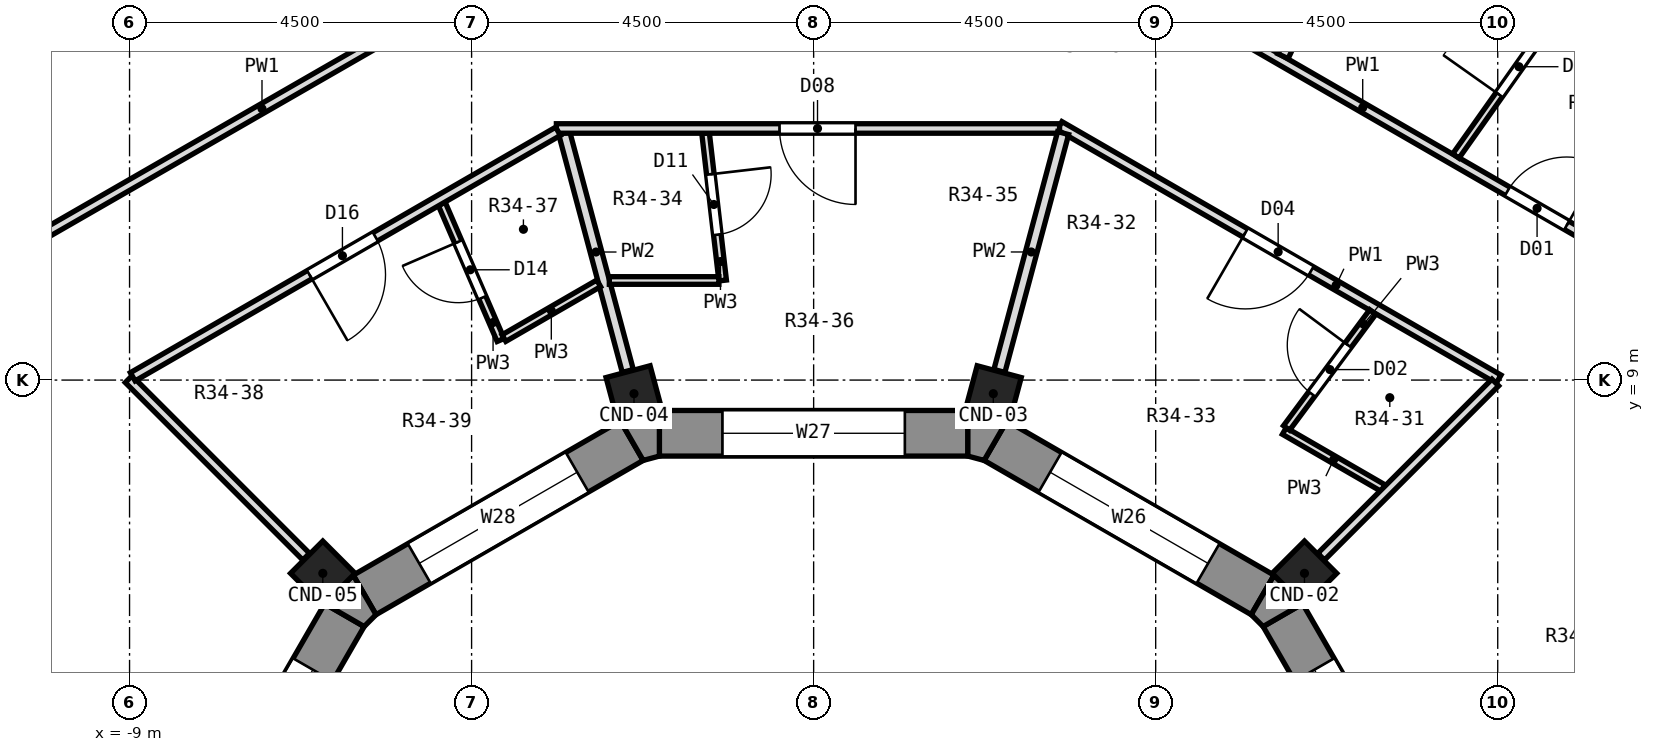
"""IFC4 building model, lengths in metres.
Left out: names, types, materials, properties, quantities, classifications, styles, units other than length and angle.
Written with IfcOpenShell. Run it as: python <this file> out.ifc"""

import sys

from ifc_helpers import new_model, si_unit, direction, frame, frame_2d, origin, origin_2d, place, context, subcontext, project, spatial, polyline, rectangle, outline, extrude, element, fill, save


model = new_model("IFC4")
c1 = context("Model", 3, precision=1e-05, world=origin(), true_north=direction((0.0, 1.0)))
c2 = subcontext(c1, "Body", "Model", "MODEL_VIEW")
j1 = project(units=[si_unit("LENGTHUNIT", "METRE"), si_unit("PLANEANGLEUNIT", "RADIAN")], contexts=[c1])
p1 = place(None, origin())
s1 = spatial("IfcSite", under=j1, at=p1, CompositionType="ELEMENT")
p2 = place(p1, origin())
s2 = spatial("IfcBuilding", under=s1, at=p2, CompositionType="ELEMENT")
p3 = place(p2, frame((0.0, 0.0, 239.6)))
s3 = spatial("IfcBuildingStorey", under=s2, at=p3, CompositionType="ELEMENT", Elevation=239.6)
for number, where, z_axis, x_axis in (
    (1, (6.458, 6.458, 0.0), (0.0, 0.0, 1.0), (0.707, 0.707, 0.0)),
    (2, (2.364, 8.821, 0.0), (0.0, 0.0, 1.0), (0.259, 0.966, 0.0)),
    (3, (-2.364, 8.821, 0.0), (0.0, 0.0, 1.0), (-0.259, 0.966, 0.0)),
    (4, (-6.458, 6.458, 0.0), (0.0, 0.0, 1.0), (-0.707, 0.707, 0.0)),
):
    element("IfcColumn", number, at=place(p3, frame(where, z_axis=z_axis, x_axis=x_axis)), inside=s3, PredefinedType="COLUMN", context=c2, shape_type="SweptSolid", body=[
        extrude(rectangle(XDim=0.6, YDim=0.6, at=origin_2d()), origin(), (0.0, 0.0, 1.0), 3.3),
    ])
p4 = place(p3, frame((8.203, 2.393, 0.0), z_axis=(0.0, 0.0, 1.0), x_axis=(-0.499994954979, 0.866028316509, 0.0)))
e5 = element("IfcWall", 5, at=p4, inside=s3, PredefinedType="SOLIDWALL", context=c2, shape_type="SweptSolid", body=[
    extrude(rectangle(XDim=4.059, YDim=0.6, at=frame_2d((2.029, 0.0))), origin(), (0.0, 0.0, 1.0), 2.9),
])
p5 = place(p4, frame((0.829, 0.0, 0.9)))
e6 = element("IfcOpeningElement", 6, at=p5, cuts=e5, PredefinedType="OPENING", context=c2, shape_type="SweptSolid", body=[
    extrude(rectangle(XDim=2.4, YDim=1.8, at=frame_2d((1.2, 0.9))), frame((0.0, 0.312, 0.0), z_axis=(0.0, -1.0, 0.0), x_axis=(1.0, 0.0, 0.0)), (0.0, 0.0, 1.0), 0.624),
])
p6 = place(p3, frame((5.907, 6.173, 0.0), z_axis=(0.0, 0.0, 1.0), x_axis=(-0.866028316509, 0.499994954979, 0.0)))
e7 = element("IfcWall", 7, at=p6, inside=s3, PredefinedType="SOLIDWALL", context=c2, shape_type="SweptSolid", body=[
    extrude(rectangle(XDim=4.059, YDim=0.6, at=frame_2d((2.029, 0.0))), origin(), (0.0, 0.0, 1.0), 2.9),
])
p7 = place(p6, frame((0.829, 0.0, 0.9)))
e8 = element("IfcOpeningElement", 8, at=p7, cuts=e7, PredefinedType="OPENING", context=c2, shape_type="SweptSolid", body=[
    extrude(rectangle(XDim=2.4, YDim=1.8, at=frame_2d((1.2, 0.9))), frame((0.0, 0.312, 0.0), z_axis=(0.0, -1.0, 0.0), x_axis=(1.0, 0.0, 0.0)), (0.0, 0.0, 1.0), 0.624),
])
p8 = place(p3, frame((2.029, 8.3, 0.0), z_axis=(0.0, 0.0, 1.0), x_axis=(-1.0, 0.0, 0.0)))
e9 = element("IfcWall", 9, at=p8, inside=s3, PredefinedType="SOLIDWALL", context=c2, shape_type="SweptSolid", body=[
    extrude(rectangle(XDim=4.059, YDim=0.6, at=frame_2d((2.029, 0.0))), origin(), (0.0, 0.0, 1.0), 2.9),
])
p9 = place(p8, frame((0.829, 0.0, 0.9)))
e10 = element("IfcOpeningElement", 10, at=p9, cuts=e9, PredefinedType="OPENING", context=c2, shape_type="SweptSolid", body=[
    extrude(rectangle(XDim=2.4, YDim=1.8, at=frame_2d((1.2, 0.9))), frame((0.0, 0.312, 0.0), z_axis=(0.0, -1.0, 0.0), x_axis=(1.0, 0.0, 0.0)), (0.0, 0.0, 1.0), 0.624),
])
p10 = place(p3, frame((-2.393, 8.203, 0.0), z_axis=(0.0, 0.0, 1.0), x_axis=(-0.866028316509, -0.499994954979, 0.0)))
e11 = element("IfcWall", 11, at=p10, inside=s3, PredefinedType="SOLIDWALL", context=c2, shape_type="SweptSolid", body=[
    extrude(rectangle(XDim=4.059, YDim=0.6, at=frame_2d((2.029, 0.0))), origin(), (0.0, 0.0, 1.0), 2.9),
])
p11 = place(p10, frame((0.829, 0.0, 0.9)))
e12 = element("IfcOpeningElement", 12, at=p11, cuts=e11, PredefinedType="OPENING", context=c2, shape_type="SweptSolid", body=[
    extrude(rectangle(XDim=2.4, YDim=1.8, at=frame_2d((1.2, 0.9))), frame((0.0, 0.312, 0.0), z_axis=(0.0, -1.0, 0.0), x_axis=(1.0, 0.0, 0.0)), (0.0, 0.0, 1.0), 0.624),
])
p12 = place(p3, frame((-6.173, 5.907, 0.0), z_axis=(0.0, 0.0, 1.0), x_axis=(-0.499994954979, -0.866028316509, 0.0)))
e13 = element("IfcWall", 13, at=p12, inside=s3, PredefinedType="SOLIDWALL", context=c2, shape_type="SweptSolid", body=[
    extrude(rectangle(XDim=4.059, YDim=0.6, at=frame_2d((2.029, 0.0))), origin(), (0.0, 0.0, 1.0), 2.9),
])
p13 = place(p12, frame((0.829, 0.0, 0.9)))
e14 = element("IfcOpeningElement", 14, at=p13, cuts=e13, PredefinedType="OPENING", context=c2, shape_type="SweptSolid", body=[
    extrude(rectangle(XDim=2.4, YDim=1.8, at=frame_2d((1.2, 0.9))), frame((0.0, 0.312, 0.0), z_axis=(0.0, -1.0, 0.0), x_axis=(1.0, 0.0, 0.0)), (0.0, 0.0, 1.0), 0.624),
])
p14 = place(p3, origin())
e15 = element("IfcWall", 15, at=p14, inside=s3, PredefinedType="SOLIDWALL", context=c2, shape_type="SweptSolid", body=[
    extrude(outline(polyline([(6.058, 6.433), (5.758, 5.914), (5.914, 5.758), (6.433, 6.058), (6.058, 6.433)])), origin(), (0.0, 0.0, 1.0), 2.9),
])
p15 = place(p3, origin())
e16 = element("IfcWall", 16, at=p15, inside=s3, PredefinedType="SOLIDWALL", context=c2, shape_type="SweptSolid", body=[
    extrude(outline(polyline([(2.029, 8.6), (2.029, 8.0), (2.242, 7.943), (2.542, 8.462), (2.029, 8.6)])), origin(), (0.0, 0.0, 1.0), 2.9),
])
p16 = place(p3, origin())
e17 = element("IfcWall", 17, at=p16, inside=s3, PredefinedType="SOLIDWALL", context=c2, shape_type="SweptSolid", body=[
    extrude(outline(polyline([(-2.542, 8.462), (-2.242, 7.943), (-2.029, 8.0), (-2.029, 8.6), (-2.542, 8.462)])), origin(), (0.0, 0.0, 1.0), 2.9),
])
p17 = place(p3, origin())
e18 = element("IfcWall", 18, at=p17, inside=s3, PredefinedType="SOLIDWALL", context=c2, shape_type="SweptSolid", body=[
    extrude(outline(polyline([(-6.433, 6.058), (-5.914, 5.758), (-5.758, 5.914), (-6.058, 6.433), (-6.433, 6.058)])), origin(), (0.0, 0.0, 1.0), 2.9),
])
p18 = place(p3, frame((-1.422, 12.248, 0.0), z_axis=(0.0, 0.0, 1.0), x_axis=(0.115265376048, -0.993334733654, 0.0)))
e19 = element("IfcWall", 19, at=p18, inside=s3, PredefinedType="PARTITIONING", context=c2, shape_type="SweptSolid", body=[
    extrude(rectangle(XDim=1.951, YDim=0.1, at=frame_2d((0.975, 0.0))), origin(), (0.0, 0.0, 1.0), 2.9),
])
p19 = place(p18, frame((0.544, 0.0, 0.0)))
e20 = element("IfcOpeningElement", 20, at=p19, cuts=e19, PredefinedType="OPENING", context=c2, shape_type="SweptSolid", body=[
    extrude(rectangle(XDim=0.8, YDim=2.1, at=frame_2d((0.4, 1.05))), frame((0.0, 0.062, 0.0), z_axis=(0.0, -1.0, 0.0), x_axis=(1.0, 0.0, 0.0)), (0.0, 0.0, 1.0), 0.124),
])
p20 = place(p3, frame((-3.281, 12.25, 0.0), z_axis=(0.0, 0.0, 1.0), x_axis=(0.258127010189, -0.966110990834, 0.0)))
e21 = element("IfcWall", 21, at=p20, inside=s3, PredefinedType="PARTITIONING", context=c2, shape_type="SweptSolid", body=[
    extrude(rectangle(XDim=3.24, YDim=0.15, at=frame_2d((1.62, 0.0))), origin(), (0.0, 0.0, 1.0), 2.9),
])
p21 = place(p3, frame((-4.892, 11.318, 0.0), z_axis=(0.0, 0.0, 1.0), x_axis=(0.396862705984, -0.917877983503, 0.0)))
e22 = element("IfcWall", 22, at=p21, inside=s3, PredefinedType="PARTITIONING", context=c2, shape_type="SweptSolid", body=[
    extrude(rectangle(XDim=1.951, YDim=0.1, at=frame_2d((0.975, 0.0))), origin(), (0.0, 0.0, 1.0), 2.9),
])
p22 = place(p21, frame((0.544, 0.0, 0.0)))
e23 = element("IfcOpeningElement", 23, at=p22, cuts=e22, PredefinedType="OPENING", context=c2, shape_type="SweptSolid", body=[
    extrude(rectangle(XDim=0.8, YDim=2.1, at=frame_2d((0.4, 1.05))), frame((0.0, 0.062, 0.0), z_axis=(0.0, -1.0, 0.0), x_axis=(1.0, 0.0, 0.0)), (0.0, 0.0, 1.0), 0.124),
])
p23 = place(p3, frame((-9.012, 9.012, 0.0), z_axis=(0.0, 0.0, 1.0), x_axis=(0.707106781187, -0.707106781187, 0.0)))
e24 = element("IfcWall", 24, at=p23, inside=s3, PredefinedType="PARTITIONING", context=c2, shape_type="SweptSolid", body=[
    extrude(rectangle(XDim=3.302, YDim=0.125, at=frame_2d((1.651, 0.0))), origin(), (0.0, 0.0, 1.0), 2.9),
])
p24 = place(p3, frame((6.192, 8.33, 0.0), z_axis=(0.0, 0.0, 1.0), x_axis=(0.865863509184, -0.500280304893, 0.0)))
e25 = element("IfcWall", 25, at=p24, inside=s3, PredefinedType="PARTITIONING", context=c2, shape_type="SweptSolid", body=[
    extrude(rectangle(XDim=1.503, YDim=0.1, at=frame_2d((0.751, 0.0))), origin(), (0.0, 0.0, 1.0), 2.9),
])
p25 = place(p3, frame((3.236, 12.346, 0.0), z_axis=(0.0, 0.0, 1.0), x_axis=(0.866074652738, -0.499914688607, 0.0)))
e26 = element("IfcWall", 26, at=p25, inside=s3, PredefinedType="PARTITIONING", context=c2, shape_type="SweptSolid", body=[
    extrude(rectangle(XDim=6.67, YDim=0.125, at=frame_2d((3.335, 0.0))), origin(), (0.0, 0.0, 1.0), 2.9),
])
p26 = place(p25, frame((2.82, 0.0, 0.0)))
e27 = element("IfcOpeningElement", 27, at=p26, cuts=e26, PredefinedType="OPENING", context=c2, shape_type="SweptSolid", body=[
    extrude(rectangle(XDim=1.0, YDim=2.1, at=frame_2d((0.5, 1.05))), frame((0.0, 0.074, 0.0), z_axis=(0.0, -1.0, 0.0), x_axis=(1.0, 0.0, 0.0)), (0.0, 0.0, 1.0), 0.149),
])
p27 = place(p3, frame((3.824, 14.547, 0.0), z_axis=(0.0, 0.0, 1.0), x_axis=(0.866027606468, -0.499996184821, 0.0)))
e28 = element("IfcWall", 28, at=p27, inside=s3, PredefinedType="PARTITIONING", context=c2, shape_type="SweptSolid", body=[
    extrude(rectangle(XDim=7.849, YDim=0.125, at=frame_2d((3.925, 0.0))), origin(), (0.0, 0.0, 1.0), 2.9),
])
p28 = place(p27, frame((6.124, 0.0, 0.0)))
e29 = element("IfcOpeningElement", 29, at=p28, cuts=e28, PredefinedType="OPENING", context=c2, shape_type="SweptSolid", body=[
    extrude(rectangle(XDim=0.9, YDim=2.1, at=frame_2d((0.45, 1.05))), frame((0.0, 0.074, 0.0), z_axis=(0.0, -1.0, 0.0), x_axis=(1.0, 0.0, 0.0)), (0.0, 0.0, 1.0), 0.149),
])
p29 = place(p3, frame((-2.688, 10.31, 0.0), z_axis=(0.0, 0.0, 1.0), x_axis=(1.0, 0.0, 0.0)))
e30 = element("IfcWall", 30, at=p29, inside=s3, PredefinedType="PARTITIONING", context=c2, shape_type="SweptSolid", body=[
    extrude(rectangle(XDim=1.441, YDim=0.1, at=frame_2d((0.72, 0.0))), origin(), (0.0, 0.0, 1.0), 2.9),
])
p30 = place(p3, frame((-3.385, 12.31, 0.0), z_axis=(0.0, 0.0, 1.0), x_axis=(1.0, 0.0, 0.0)))
e31 = element("IfcWall", 31, at=p30, inside=s3, PredefinedType="PARTITIONING", context=c2, shape_type="SweptSolid", body=[
    extrude(rectangle(XDim=6.62, YDim=0.125, at=frame_2d((3.31, 0.0))), origin(), (0.0, 0.0, 1.0), 2.9),
])
p31 = place(p30, frame((2.936, 0.0, 0.0)))
e32 = element("IfcOpeningElement", 32, at=p31, cuts=e31, PredefinedType="OPENING", context=c2, shape_type="SweptSolid", body=[
    extrude(rectangle(XDim=1.0, YDim=2.1, at=frame_2d((0.5, 1.05))), frame((0.0, 0.074, 0.0), z_axis=(0.0, -1.0, 0.0), x_axis=(1.0, 0.0, 0.0)), (0.0, 0.0, 1.0), 0.149),
])
p32 = place(p3, frame((-10.573, 10.662, 0.0), z_axis=(0.0, 0.0, 1.0), x_axis=(0.866792171996, 0.498669560497, 0.0)))
e33 = element("IfcWall", 33, at=p32, inside=s3, PredefinedType="PARTITIONING", context=c2, shape_type="SweptSolid", body=[
    extrude(rectangle(XDim=7.651, YDim=0.125, at=frame_2d((3.825, 0.0))), origin(), (0.0, 0.0, 1.0), 2.9),
])
p33 = place(p3, frame((-4.075, 9.552, 0.0), z_axis=(0.0, 0.0, 1.0), x_axis=(0.865843856352, 0.500314317622, 0.0)))
e34 = element("IfcWall", 34, at=p33, inside=s3, PredefinedType="PARTITIONING", context=c2, shape_type="SweptSolid", body=[
    extrude(rectangle(XDim=1.44, YDim=0.1, at=frame_2d((0.72, 0.0))), origin(), (0.0, 0.0, 1.0), 2.9),
])
p34 = place(p3, frame((-8.958, 9.043, 0.0), z_axis=(0.0, 0.0, 1.0), x_axis=(0.866083637917, 0.499899121956, 0.0)))
e35 = element("IfcWall", 35, at=p34, inside=s3, PredefinedType="PARTITIONING", context=c2, shape_type="SweptSolid", body=[
    extrude(rectangle(XDim=6.46, YDim=0.125, at=frame_2d((3.23, 0.0))), origin(), (0.0, 0.0, 1.0), 2.9),
])
p35 = place(p34, frame((2.685, 0.0, 0.0)))
e36 = element("IfcOpeningElement", 36, at=p35, cuts=e35, PredefinedType="OPENING", context=c2, shape_type="SweptSolid", body=[
    extrude(rectangle(XDim=1.0, YDim=2.1, at=frame_2d((0.5, 1.05))), frame((0.0, 0.074, 0.0), z_axis=(0.0, -1.0, 0.0), x_axis=(1.0, 0.0, 0.0)), (0.0, 0.0, 1.0), 0.149),
])
p36 = place(p3, frame((6.677, 6.677, 0.0), z_axis=(0.0, 0.0, 1.0), x_axis=(0.707106781187, 0.707106781187, 0.0)))
e37 = element("IfcWall", 37, at=p36, inside=s3, PredefinedType="PARTITIONING", context=c2, shape_type="SweptSolid", body=[
    extrude(rectangle(XDim=3.24, YDim=0.125, at=frame_2d((1.62, 0.0))), origin(), (0.0, 0.0, 1.0), 2.9),
])
p37 = place(p3, frame((6.222, 8.37, 0.0), z_axis=(0.0, 0.0, 1.0), x_axis=(0.596480065154, 0.802627891289, 0.0)))
e38 = element("IfcWall", 38, at=p37, inside=s3, PredefinedType="PARTITIONING", context=c2, shape_type="SweptSolid", body=[
    extrude(rectangle(XDim=1.901, YDim=0.1, at=frame_2d((0.95, 0.0))), origin(), (0.0, 0.0, 1.0), 2.9),
])
p38 = place(p37, frame((0.557, 0.0, 0.0)))
e39 = element("IfcOpeningElement", 39, at=p38, cuts=e38, PredefinedType="OPENING", context=c2, shape_type="SweptSolid", body=[
    extrude(rectangle(XDim=0.8, YDim=2.1, at=frame_2d((0.4, 1.05))), frame((0.0, 0.062, 0.0), z_axis=(0.0, -1.0, 0.0), x_axis=(1.0, 0.0, 0.0)), (0.0, 0.0, 1.0), 0.124),
])
p39 = place(p3, frame((8.449, 11.948, 0.0), z_axis=(0.0, 0.0, 1.0), x_axis=(0.577346566694, 0.816499198975, 0.0)))
e40 = element("IfcWall", 40, at=p39, inside=s3, PredefinedType="PARTITIONING", context=c2, shape_type="SweptSolid", body=[
    extrude(rectangle(XDim=2.889, YDim=0.1, at=frame_2d((1.444, 0.0))), origin(), (0.0, 0.0, 1.0), 2.9),
])
p40 = place(p39, frame((0.988, 0.0, 0.0)))
e41 = element("IfcOpeningElement", 41, at=p40, cuts=e40, PredefinedType="OPENING", context=c2, shape_type="SweptSolid", body=[
    extrude(rectangle(XDim=0.9, YDim=2.1, at=frame_2d((0.45, 1.05))), frame((0.0, 0.062, 0.0), z_axis=(0.0, -1.0, 0.0), x_axis=(1.0, 0.0, 0.0)), (0.0, 0.0, 1.0), 0.124),
])
p41 = place(p3, frame((6.175, 13.261, 0.0), z_axis=(0.0, 0.0, 1.0), x_axis=(0.425078700153, 0.905156394595, 0.0)))
e42 = element("IfcWall", 42, at=p41, inside=s3, PredefinedType="PARTITIONING", context=c2, shape_type="SweptSolid", body=[
    extrude(rectangle(XDim=7.187, YDim=0.15, at=frame_2d((3.593, 0.0))), origin(), (0.0, 0.0, 1.0), 2.9),
])
p42 = place(p3, frame((2.444, 9.12, 0.0), z_axis=(0.0, 0.0, 1.0), x_axis=(0.258727295272, 0.965950405912, 0.0)))
e43 = element("IfcWall", 43, at=p42, inside=s3, PredefinedType="PARTITIONING", context=c2, shape_type="SweptSolid", body=[
    extrude(rectangle(XDim=3.24, YDim=0.15, at=frame_2d((1.62, 0.0))), origin(), (0.0, 0.0, 1.0), 2.9),
])
p43 = place(p5, origin())
e44 = element("IfcWindow", 44, at=p43, inside=s3, PartitioningType="SINGLE_PANEL", PredefinedType="WINDOW", context=c2, shape_type="SweptSolid", body=[
    extrude(rectangle(XDim=2.4, YDim=1.8, at=frame_2d((1.2, 0.9))), frame((0.0, -0.12, 0.0), z_axis=(0.0, -1.0, 0.0), x_axis=(1.0, 0.0, 0.0)), (0.0, 0.0, 1.0), 0.06),
])
fill(e6, e44)
p44 = place(p7, origin())
e45 = element("IfcWindow", 45, at=p44, inside=s3, PartitioningType="SINGLE_PANEL", PredefinedType="WINDOW", context=c2, shape_type="SweptSolid", body=[
    extrude(rectangle(XDim=2.4, YDim=1.8, at=frame_2d((1.2, 0.9))), frame((0.0, -0.12, 0.0), z_axis=(0.0, -1.0, 0.0), x_axis=(1.0, 0.0, 0.0)), (0.0, 0.0, 1.0), 0.06),
])
fill(e8, e45)
p45 = place(p9, origin())
e46 = element("IfcWindow", 46, at=p45, inside=s3, PartitioningType="SINGLE_PANEL", PredefinedType="WINDOW", context=c2, shape_type="SweptSolid", body=[
    extrude(rectangle(XDim=2.4, YDim=1.8, at=frame_2d((1.2, 0.9))), frame((0.0, -0.12, 0.0), z_axis=(0.0, -1.0, 0.0), x_axis=(1.0, 0.0, 0.0)), (0.0, 0.0, 1.0), 0.06),
])
fill(e10, e46)
p46 = place(p11, origin())
e47 = element("IfcWindow", 47, at=p46, inside=s3, PartitioningType="SINGLE_PANEL", PredefinedType="WINDOW", context=c2, shape_type="SweptSolid", body=[
    extrude(rectangle(XDim=2.4, YDim=1.8, at=frame_2d((1.2, 0.9))), frame((0.0, -0.12, 0.0), z_axis=(0.0, -1.0, 0.0), x_axis=(1.0, 0.0, 0.0)), (0.0, 0.0, 1.0), 0.06),
])
fill(e12, e47)
p47 = place(p13, origin())
e48 = element("IfcWindow", 48, at=p47, inside=s3, PartitioningType="SINGLE_PANEL", PredefinedType="WINDOW", context=c2, shape_type="SweptSolid", body=[
    extrude(rectangle(XDim=2.4, YDim=1.8, at=frame_2d((1.2, 0.9))), frame((0.0, -0.12, 0.0), z_axis=(0.0, -1.0, 0.0), x_axis=(1.0, 0.0, 0.0)), (0.0, 0.0, 1.0), 0.06),
])
fill(e14, e48)
p48 = place(p28, origin())
e49 = element("IfcDoor", 49, at=p48, inside=s3, OperationType="SINGLE_SWING_RIGHT", PredefinedType="DOOR", context=c2, shape_type="SweptSolid", body=[
    extrude(rectangle(XDim=0.9, YDim=2.1, at=frame_2d((0.45, 1.05))), frame((0.0, 0.025, 0.0), z_axis=(0.0, -1.0, 0.0), x_axis=(1.0, 0.0, 0.0)), (0.0, 0.0, 1.0), 0.05),
])
fill(e29, e49)
p49 = place(p38, origin())
e50 = element("IfcDoor", 50, at=p49, inside=s3, OperationType="SINGLE_SWING_RIGHT", PredefinedType="DOOR", context=c2, shape_type="SweptSolid", body=[
    extrude(rectangle(XDim=0.8, YDim=2.1, at=frame_2d((0.4, 1.05))), frame((0.0, 0.025, 0.0), z_axis=(0.0, -1.0, 0.0), x_axis=(1.0, 0.0, 0.0)), (0.0, 0.0, 1.0), 0.05),
])
fill(e39, e50)
p50 = place(p40, origin())
e51 = element("IfcDoor", 51, at=p50, inside=s3, OperationType="SINGLE_SWING_LEFT", PredefinedType="DOOR", context=c2, shape_type="SweptSolid", body=[
    extrude(rectangle(XDim=0.9, YDim=2.1, at=frame_2d((0.45, 1.05))), frame((0.0, 0.025, 0.0), z_axis=(0.0, -1.0, 0.0), x_axis=(1.0, 0.0, 0.0)), (0.0, 0.0, 1.0), 0.05),
])
fill(e41, e51)
p51 = place(p26, frame((1.0, 0.0, 0.0), z_axis=(0.0, 0.0, 1.0), x_axis=(-1.0, 0.0, 0.0)))
e52 = element("IfcDoor", 52, at=p51, inside=s3, OperationType="SINGLE_SWING_RIGHT", PredefinedType="DOOR", context=c2, shape_type="SweptSolid", body=[
    extrude(rectangle(XDim=1.0, YDim=2.1, at=frame_2d((0.5, 1.05))), frame((0.0, 0.025, 0.0), z_axis=(0.0, -1.0, 0.0), x_axis=(1.0, 0.0, 0.0)), (0.0, 0.0, 1.0), 0.05),
])
fill(e27, e52)
p52 = place(p31, frame((1.0, 0.0, 0.0), z_axis=(0.0, 0.0, 1.0), x_axis=(-1.0, 0.0, 0.0)))
e53 = element("IfcDoor", 53, at=p52, inside=s3, OperationType="SINGLE_SWING_LEFT", PredefinedType="DOOR", context=c2, shape_type="SweptSolid", body=[
    extrude(rectangle(XDim=1.0, YDim=2.1, at=frame_2d((0.5, 1.05))), frame((0.0, 0.025, 0.0), z_axis=(0.0, -1.0, 0.0), x_axis=(1.0, 0.0, 0.0)), (0.0, 0.0, 1.0), 0.05),
])
fill(e32, e53)
p53 = place(p19, origin())
e54 = element("IfcDoor", 54, at=p53, inside=s3, OperationType="SINGLE_SWING_LEFT", PredefinedType="DOOR", context=c2, shape_type="SweptSolid", body=[
    extrude(rectangle(XDim=0.8, YDim=2.1, at=frame_2d((0.4, 1.05))), frame((0.0, 0.025, 0.0), z_axis=(0.0, -1.0, 0.0), x_axis=(1.0, 0.0, 0.0)), (0.0, 0.0, 1.0), 0.05),
])
fill(e20, e54)
p54 = place(p22, frame((0.8, 0.0, 0.0), z_axis=(0.0, 0.0, 1.0), x_axis=(-1.0, 0.0, 0.0)))
e55 = element("IfcDoor", 55, at=p54, inside=s3, OperationType="SINGLE_SWING_RIGHT", PredefinedType="DOOR", context=c2, shape_type="SweptSolid", body=[
    extrude(rectangle(XDim=0.8, YDim=2.1, at=frame_2d((0.4, 1.05))), frame((0.0, 0.025, 0.0), z_axis=(0.0, -1.0, 0.0), x_axis=(1.0, 0.0, 0.0)), (0.0, 0.0, 1.0), 0.05),
])
fill(e23, e55)
p55 = place(p35, frame((1.0, 0.0, 0.0), z_axis=(0.0, 0.0, 1.0), x_axis=(-1.0, 0.0, 0.0)))
e56 = element("IfcDoor", 56, at=p55, inside=s3, OperationType="SINGLE_SWING_RIGHT", PredefinedType="DOOR", context=c2, shape_type="SweptSolid", body=[
    extrude(rectangle(XDim=1.0, YDim=2.1, at=frame_2d((0.5, 1.05))), frame((0.0, 0.025, 0.0), z_axis=(0.0, -1.0, 0.0), x_axis=(1.0, 0.0, 0.0)), (0.0, 0.0, 1.0), 0.05),
])
fill(e36, e56)
save(model, sys.argv[1])
